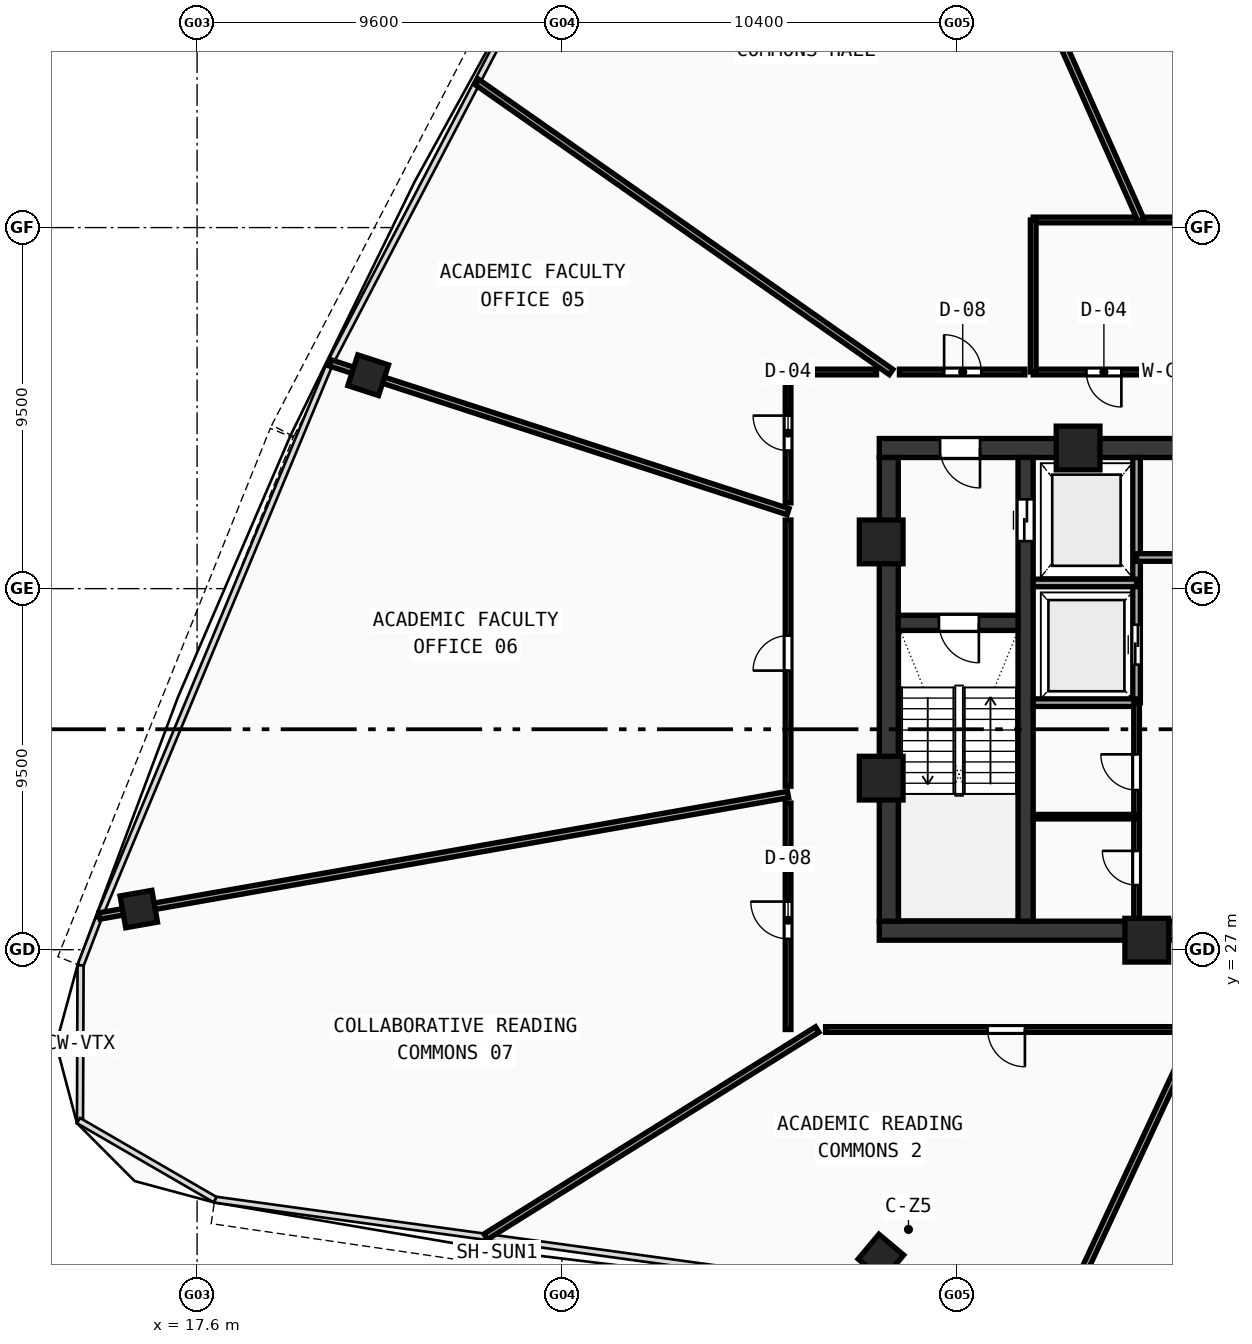
"""IFC4 building model, lengths in metres.
Left out: names, types, materials, properties, quantities, classifications, styles, units other than length and angle.
Written with IfcOpenShell. Run it as: python <this file> out.ifc"""

import sys

from ifc_helpers import new_model, si_unit, direction, frame, frame_2d, origin, origin_with_axes, origin_2d, place, context, subcontext, project, spatial, rectangle, hollow_rectangle, extrude, source, transform, mapped, element, fill, save


model = new_model("IFC4")
c1 = context("Model", 3, precision=1e-05, world=origin(), true_north=direction((0.0, 1.0)))
c2 = subcontext(c1, "Body", "Model", "MODEL_VIEW")
j1 = project(units=[si_unit("LENGTHUNIT", "METRE"), si_unit("PLANEANGLEUNIT", "RADIAN")], contexts=[c1])
p1 = place(None, origin())
s1 = spatial("IfcSite", under=j1, at=p1, CompositionType="ELEMENT")
p2 = place(p1, origin())
s2 = spatial("IfcBuilding", under=s1, at=p2, CompositionType="ELEMENT")
p3 = place(p2, frame((0.0, 0.0, 263.18)))
s3 = spatial("IfcBuildingStorey", under=s2, at=p3, CompositionType="ELEMENT", Elevation=263.18)
p4 = place(p3, frame((35.55, 27.5, 0.0), z_axis=(0.0, 0.0, 1.0), x_axis=(1.0, 0.0, 0.0)))
e1 = element("IfcWall", 1, at=p4, inside=s3, PredefinedType="SHEAR", context=c2, shape_type="SweptSolid", body=[
    extrude(rectangle(XDim=24.9, YDim=0.5, at=frame_2d((12.45, 0.0))), origin(), (0.0, 0.0, 1.0), 3.47),
])
p5 = place(p3, frame((35.55, 40.2, 0.0), z_axis=(0.0, 0.0, 1.0), x_axis=(1.0, 0.0, 0.0)))
e2 = element("IfcWall", 2, at=p5, inside=s3, PredefinedType="SHEAR", context=c2, shape_type="SweptSolid", body=[
    extrude(rectangle(XDim=11.25, YDim=0.5, at=frame_2d((5.625, 0.0))), origin(), (0.0, 0.0, 1.0), 3.47),
])
p6 = place(p5, frame((1.6, 0.0, 0.0)))
e3 = element("IfcOpeningElement", 3, at=p6, cuts=e2, PredefinedType="OPENING", context=c2, shape_type="SweptSolid", body=[
    extrude(rectangle(XDim=1.05, YDim=2.1, at=frame_2d((0.525, 1.05))), frame((0.0, 0.26, 0.0), z_axis=(0.0, -1.0, 0.0), x_axis=(1.0, 0.0, 0.0)), (0.0, 0.0, 1.0), 0.52),
])
p7 = place(p3, frame((35.8, 27.75, 0.0), z_axis=(0.0, 0.0, 1.0), x_axis=(0.0, 1.0, 0.0)))
e4 = element("IfcWall", 4, at=p7, inside=s3, PredefinedType="SHEAR", context=c2, shape_type="SweptSolid", body=[
    extrude(rectangle(XDim=12.2, YDim=0.5, at=frame_2d((6.1, 0.0))), origin(), (0.0, 0.0, 1.0), 3.47),
])
p8 = place(p3, frame((39.4, 27.75, 0.0), z_axis=(0.0, 0.0, 1.0), x_axis=(0.0, 1.0, 0.0)))
e5 = element("IfcWall", 5, at=p8, inside=s3, PredefinedType="SHEAR", context=c2, shape_type="SweptSolid", body=[
    extrude(rectangle(XDim=12.2, YDim=0.4, at=frame_2d((6.1, 0.0))), origin(), (0.0, 0.0, 1.0), 3.47),
])
p9 = place(p8, frame((10.0, 0.0, 0.0)))
e6 = element("IfcOpeningElement", 6, at=p9, cuts=e5, PredefinedType="OPENING", context=c2, shape_type="SweptSolid", body=[
    extrude(rectangle(XDim=1.1, YDim=2.1, at=frame_2d((0.55, 1.05))), frame((0.0, 0.21, 0.0), z_axis=(0.0, -1.0, 0.0), x_axis=(1.0, 0.0, 0.0)), (0.0, 0.0, 1.0), 0.42),
])
p10 = place(p3, frame((36.05, 35.6, 0.0), z_axis=(0.0, 0.0, 1.0), x_axis=(1.0, 0.0, 0.0)))
e7 = element("IfcWall", 7, at=p10, inside=s3, PredefinedType="SHEAR", context=c2, shape_type="SweptSolid", body=[
    extrude(rectangle(XDim=3.15, YDim=0.4, at=frame_2d((1.575, 0.0))), origin(), (0.0, 0.0, 1.0), 3.47),
])
p11 = place(p10, frame((1.07, 0.0, 0.0)))
e8 = element("IfcOpeningElement", 8, at=p11, cuts=e7, PredefinedType="OPENING", context=c2, shape_type="SweptSolid", body=[
    extrude(rectangle(XDim=1.05, YDim=2.1, at=frame_2d((0.525, 1.05))), frame((0.0, 0.21, 0.0), z_axis=(0.0, -1.0, 0.0), x_axis=(1.0, 0.0, 0.0)), (0.0, 0.0, 1.0), 0.42),
])
m1 = source(origin(), c2, "Body", "SweptSolid", [
    extrude(hollow_rectangle(XDim=1.15, YDim=1.15, WallThickness=0.048, at=origin_2d()), origin(), (0.0, 0.0, 1.0), 3.73),
])
for number, where, z_axis, x_axis in (
    (9, (42.588, 27.25, -0.26), (0.0, 0.0, 1.0), (1.0, 0.0, 0.0)),
    (10, (40.781, 40.2, -0.26), (0.0, 0.0, 1.0), (1.0, 0.0, 0.0)),
    (11, (35.6, 37.729, -0.26), (0.0, 0.0, 1.0), (1.0, 0.0, 0.0)),
    (12, (35.6, 31.513, -0.26), (0.0, 0.0, 1.0), (1.0, 0.0, 0.0)),
):
    element("IfcColumn", number, at=place(p3, frame(where, z_axis=z_axis, x_axis=x_axis)), inside=s3, PredefinedType="COLUMN", context=c2, shape_type="MappedRepresentation", body=[
        mapped(m1, transform((0.0, 0.0, 0.0), scale=1.0)),
    ])
m2 = source(origin(), c2, "Body", "SweptSolid", [
    extrude(hollow_rectangle(XDim=0.85, YDim=0.85, WallThickness=0.034, at=origin_2d()), origin(), (0.0, 0.0, 1.0), 3.73),
])
for number, where, z_axis, x_axis in (
    (13, (35.593, 18.914, -0.26), (0.0, 0.0, 1.0), (0.766, -0.643, 0.0)),
    (14, (22.102, 42.115, -0.26), (0.0, 0.0, 1.0), (-0.309, -0.951, 0.0)),
    (15, (16.066, 28.069, -0.26), (0.0, 0.0, 1.0), (0.174, -0.985, 0.0)),
):
    element("IfcColumn", number, at=place(p3, frame(where, z_axis=z_axis, x_axis=x_axis)), inside=s3, PredefinedType="COLUMN", context=c2, shape_type="MappedRepresentation", body=[
        mapped(m2, transform((0.0, 0.0, 0.0), scale=1.0)),
    ])
p12 = place(p3, frame((42.32, 33.5, 0.0), z_axis=(0.0, 0.0, 1.0), x_axis=(0.0, 1.0, 0.0)))
e16 = element("IfcWall", 16, at=p12, inside=s3, PredefinedType="SOLIDWALL", context=c2, shape_type="SweptSolid", body=[
    extrude(rectangle(XDim=6.45, YDim=0.2, at=frame_2d((3.225, 0.0))), origin(), (0.0, 0.0, 1.0), 3.47),
])
p13 = place(p12, frame((1.0, 0.0, 0.0)))
e17 = element("IfcOpeningElement", 17, at=p13, cuts=e16, PredefinedType="OPENING", context=c2, shape_type="SweptSolid", body=[
    extrude(rectangle(XDim=1.05, YDim=2.1, at=frame_2d((0.525, 1.05))), frame((0.0, 0.11, 0.0), z_axis=(0.0, -1.0, 0.0), x_axis=(1.0, 0.0, 0.0)), (0.0, 0.0, 1.0), 0.22),
])
for number, where, z_axis, x_axis in (
    (18, (39.6, 36.65, 0.0), (0.0, 0.0, 1.0), (1.0, 0.0, 0.0)),
    (19, (39.6, 33.5, 0.0), (0.0, 0.0, 1.0), (1.0, 0.0, 0.0)),
):
    element("IfcWall", number, at=place(p3, frame(where, z_axis=z_axis, x_axis=x_axis)), inside=s3, PredefinedType="SOLIDWALL", context=c2, shape_type="SweptSolid", body=[
        extrude(rectangle(XDim=2.72, YDim=0.2, at=frame_2d((1.36, 0.0))), origin(), (0.0, 0.0, 1.0), 3.47),
    ])
p14 = place(p3, frame((42.32, 37.32, 0.0), z_axis=(0.0, 0.0, 1.0), x_axis=(1.0, 0.0, 0.0)))
e20 = element("IfcWall", 20, at=p14, inside=s3, PredefinedType="SOLIDWALL", context=c2, shape_type="SweptSolid", body=[
    extrude(rectangle(XDim=4.73, YDim=0.2, at=frame_2d((2.365, 0.0))), origin(), (0.0, 0.0, 1.0), 3.47),
])
p15 = place(p14, frame((1.8, 0.0, 0.0)))
e21 = element("IfcOpeningElement", 21, at=p15, cuts=e20, PredefinedType="OPENING", context=c2, shape_type="SweptSolid", body=[
    extrude(rectangle(XDim=0.9, YDim=2.1, at=frame_2d((0.45, 1.05))), frame((0.0, 0.11, 0.0), z_axis=(0.0, -1.0, 0.0), x_axis=(1.0, 0.0, 0.0)), (0.0, 0.0, 1.0), 0.22),
])
p16 = place(p3, frame((42.32, 27.6, 0.0), z_axis=(0.0, 0.0, 1.0), x_axis=(0.0, 1.0, 0.0)))
e22 = element("IfcWall", 22, at=p16, inside=s3, PredefinedType="PARTITIONING", context=c2, shape_type="SweptSolid", body=[
    extrude(rectangle(XDim=5.9, YDim=0.15, at=frame_2d((2.95, 0.0))), origin(), (0.0, 0.0, 1.0), 3.47),
])
p17 = place(p16, frame((1.1, 0.0, 0.0)))
e23 = element("IfcOpeningElement", 23, at=p17, cuts=e22, PredefinedType="OPENING", context=c2, shape_type="SweptSolid", body=[
    extrude(rectangle(XDim=0.9, YDim=2.1, at=frame_2d((0.45, 1.05))), frame((0.0, 0.085, 0.0), z_axis=(0.0, -1.0, 0.0), x_axis=(1.0, 0.0, 0.0)), (0.0, 0.0, 1.0), 0.17),
])
p18 = place(p16, frame((3.6, 0.0, 0.0)))
e24 = element("IfcOpeningElement", 24, at=p18, cuts=e22, PredefinedType="OPENING", context=c2, shape_type="SweptSolid", body=[
    extrude(rectangle(XDim=0.94, YDim=2.1, at=frame_2d((0.47, 1.05))), frame((0.0, 0.085, 0.0), z_axis=(0.0, -1.0, 0.0), x_axis=(1.0, 0.0, 0.0)), (0.0, 0.0, 1.0), 0.17),
])
p19 = place(p3, frame((39.6, 30.5, 0.0), z_axis=(0.0, 0.0, 1.0), x_axis=(1.0, 0.0, 0.0)))
e25 = element("IfcWall", 25, at=p19, inside=s3, PredefinedType="PARTITIONING", context=c2, shape_type="SweptSolid", body=[
    extrude(rectangle(XDim=2.72, YDim=0.12, at=frame_2d((1.36, 0.0))), origin(), (0.0, 0.0, 1.0), 3.47),
])
p20 = place(p3, frame((39.6, 42.2, 0.0), z_axis=(0.0, 0.0, 1.0), x_axis=(1.0, 0.0, 0.0)))
e26 = element("IfcWall", 26, at=p20, inside=s3, PredefinedType="PARTITIONING", context=c2, shape_type="SweptSolid", body=[
    extrude(rectangle(XDim=4.35, YDim=0.15, at=frame_2d((2.175, 0.0))), origin(), (0.0, 0.0, 1.0), 3.47),
])
p21 = place(p20, frame((1.4, 0.0, 0.0)))
e27 = element("IfcOpeningElement", 27, at=p21, cuts=e26, PredefinedType="OPENING", context=c2, shape_type="SweptSolid", body=[
    extrude(rectangle(XDim=0.92, YDim=2.1, at=frame_2d((0.46, 1.05))), frame((0.0, 0.085, 0.0), z_axis=(0.0, -1.0, 0.0), x_axis=(1.0, 0.0, 0.0)), (0.0, 0.0, 1.0), 0.17),
])
p22 = place(p3, frame((39.6, 46.2, 0.0), z_axis=(0.0, 0.0, 1.0), x_axis=(1.0, 0.0, 0.0)))
e28 = element("IfcWall", 28, at=p22, inside=s3, PredefinedType="PARTITIONING", context=c2, shape_type="SweptSolid", body=[
    extrude(rectangle(XDim=4.35, YDim=0.15, at=frame_2d((2.175, 0.0))), origin(), (0.0, 0.0, 1.0), 2.82),
])
p23 = place(p3, frame((39.6, 42.2, 0.0), z_axis=(0.0, 0.0, 1.0), x_axis=(0.0, 1.0, 0.0)))
e29 = element("IfcWall", 29, at=p23, inside=s3, PredefinedType="PARTITIONING", context=c2, shape_type="SweptSolid", body=[
    extrude(rectangle(XDim=4.0, YDim=0.15, at=frame_2d((2.0, 0.0))), origin(), (0.0, 0.0, 1.0), 3.47),
])
p24 = place(p3, frame((42.435, 46.2, 0.0), z_axis=(0.0, 0.0, 1.0), x_axis=(-0.406734534197, 0.913546396573, 0.0)))
e30 = element("IfcWall", 30, at=p24, inside=s3, PredefinedType="PARTITIONING", context=c2, shape_type="SweptSolid", body=[
    extrude(rectangle(XDim=20.329, YDim=0.17, at=frame_2d((10.164, 0.0))), origin(), (0.0, 0.0, 1.0), 2.82),
])
p25 = place(p3, frame((35.861, 42.2, 0.0), z_axis=(0.0, 0.0, 1.0), x_axis=(-0.819147381932, 0.57358309483, 0.0)))
e31 = element("IfcWall", 31, at=p25, inside=s3, PredefinedType="PARTITIONING", context=c2, shape_type="SweptSolid", body=[
    extrude(rectangle(XDim=13.297, YDim=0.17, at=frame_2d((6.649, 0.0))), origin(), (0.0, 0.0, 1.0), 2.82),
])
p26 = place(p3, frame((33.15, 38.525, 0.0), z_axis=(0.0, 0.0, 1.0), x_axis=(-0.951057436246, 0.309014163043, 0.0)))
e32 = element("IfcWall", 32, at=p26, inside=s3, PredefinedType="PARTITIONING", context=c2, shape_type="SweptSolid", body=[
    extrude(rectangle(XDim=12.667, YDim=0.17, at=frame_2d((6.333, 0.0))), origin(), (0.0, 0.0, 1.0), 2.82),
])
p27 = place(p3, frame((33.15, 31.082, 0.0), z_axis=(0.0, 0.0, 1.0), x_axis=(-0.984806394916, -0.173655879639, 0.0)))
e33 = element("IfcWall", 33, at=p27, inside=s3, PredefinedType="PARTITIONING", context=c2, shape_type="SweptSolid", body=[
    extrude(rectangle(XDim=18.397, YDim=0.17, at=frame_2d((9.199, 0.0))), origin(), (0.0, 0.0, 1.0), 2.82),
])
p28 = place(p3, frame((33.917, 24.9, 0.0), z_axis=(0.0, 0.0, 1.0), x_axis=(-0.848046300914, -0.529922137211, 0.0)))
e34 = element("IfcWall", 34, at=p28, inside=s3, PredefinedType="PARTITIONING", context=c2, shape_type="SweptSolid", body=[
    extrude(rectangle(XDim=10.287, YDim=0.17, at=frame_2d((5.143, 0.0))), origin(), (0.0, 0.0, 1.0), 2.82),
])
p29 = place(p3, frame((43.896, 24.9, 0.0), z_axis=(0.0, 0.0, 1.0), x_axis=(-0.422631029952, -0.906301833012, 0.0)))
e35 = element("IfcWall", 35, at=p29, inside=s3, PredefinedType="PARTITIONING", context=c2, shape_type="SweptSolid", body=[
    extrude(rectangle(XDim=7.827, YDim=0.17, at=frame_2d((3.914, 0.0))), origin(), (0.0, 0.0, 1.0), 2.82),
])
p30 = place(p3, frame((33.15, 24.9, 0.0), z_axis=(0.0, 0.0, 1.0), x_axis=(0.0, 1.0, 0.0)))
e36 = element("IfcWall", 36, at=p30, inside=s3, PredefinedType="PARTITIONING", context=c2, shape_type="SweptSolid", body=[
    extrude(rectangle(XDim=5.958, YDim=0.15, at=frame_2d((2.979, 0.0))), origin(), (0.0, 0.0, 1.0), 3.12),
])
p31 = place(p30, frame((2.386, 0.0, 0.0)))
e37 = element("IfcOpeningElement", 37, at=p31, cuts=e36, PredefinedType="OPENING", context=c2, shape_type="SweptSolid", body=[
    extrude(rectangle(XDim=0.98, YDim=2.12, at=frame_2d((0.49, 1.06))), frame((0.0, 0.085, 0.0), z_axis=(0.0, -1.0, 0.0), x_axis=(1.0, 0.0, 0.0)), (0.0, 0.0, 1.0), 0.17),
])
p32 = place(p3, frame((33.15, 31.301, 0.0), z_axis=(0.0, 0.0, 1.0), x_axis=(0.0, 1.0, 0.0)))
e38 = element("IfcWall", 38, at=p32, inside=s3, PredefinedType="PARTITIONING", context=c2, shape_type="SweptSolid", body=[
    extrude(rectangle(XDim=7.004, YDim=0.15, at=frame_2d((3.502, 0.0))), origin(), (0.0, 0.0, 1.0), 3.47),
])
p33 = place(p32, frame((3.042, 0.0, 0.0)))
e39 = element("IfcOpeningElement", 39, at=p33, cuts=e38, PredefinedType="OPENING", context=c2, shape_type="SweptSolid", body=[
    extrude(rectangle(XDim=0.92, YDim=2.1, at=frame_2d((0.46, 1.05))), frame((0.0, 0.085, 0.0), z_axis=(0.0, -1.0, 0.0), x_axis=(1.0, 0.0, 0.0)), (0.0, 0.0, 1.0), 0.17),
])
p34 = place(p3, frame((33.15, 38.756, 0.0), z_axis=(0.0, 0.0, 1.0), x_axis=(0.0, 1.0, 0.0)))
e40 = element("IfcWall", 40, at=p34, inside=s3, PredefinedType="PARTITIONING", context=c2, shape_type="SweptSolid", body=[
    extrude(rectangle(XDim=3.444, YDim=0.15, at=frame_2d((1.722, 0.0))), origin(), (0.0, 0.0, 1.0), 3.12),
])
p35 = place(p34, frame((1.376, 0.0, 0.0)))
e41 = element("IfcOpeningElement", 41, at=p35, cuts=e40, PredefinedType="OPENING", context=c2, shape_type="SweptSolid", body=[
    extrude(rectangle(XDim=0.92, YDim=2.1, at=frame_2d((0.46, 1.05))), frame((0.0, 0.085, 0.0), z_axis=(0.0, -1.0, 0.0), x_axis=(1.0, 0.0, 0.0)), (0.0, 0.0, 1.0), 0.17),
])
p36 = place(p3, frame((33.15, 42.2, 0.0), z_axis=(0.0, 0.0, 1.0), x_axis=(1.0, 0.0, 0.0)))
e42 = element("IfcWall", 42, at=p36, inside=s3, PredefinedType="PARTITIONING", context=c2, shape_type="SweptSolid", body=[
    extrude(rectangle(XDim=2.327, YDim=0.15, at=frame_2d((1.164, 0.0))), origin(), (0.0, 0.0, 1.0), 3.12),
])
p37 = place(p3, frame((36.081, 42.2, 0.0), z_axis=(0.0, 0.0, 1.0), x_axis=(1.0, 0.0, 0.0)))
e43 = element("IfcWall", 43, at=p37, inside=s3, PredefinedType="PARTITIONING", context=c2, shape_type="SweptSolid", body=[
    extrude(rectangle(XDim=3.299, YDim=0.15, at=frame_2d((1.65, 0.0))), origin(), (0.0, 0.0, 1.0), 2.82),
])
p38 = place(p37, frame((1.175, 0.0, 0.0)))
e44 = element("IfcOpeningElement", 44, at=p38, cuts=e43, PredefinedType="OPENING", context=c2, shape_type="SweptSolid", body=[
    extrude(rectangle(XDim=0.98, YDim=2.12, at=frame_2d((0.49, 1.06))), frame((0.0, 0.085, 0.0), z_axis=(0.0, -1.0, 0.0), x_axis=(1.0, 0.0, 0.0)), (0.0, 0.0, 1.0), 0.17),
])
p39 = place(p3, frame((43.654, 24.9, 0.0), z_axis=(0.0, 0.0, 1.0), x_axis=(-1.0, 0.0, 0.0)))
e45 = element("IfcWall", 45, at=p39, inside=s3, PredefinedType="PARTITIONING", context=c2, shape_type="SweptSolid", body=[
    extrude(rectangle(XDim=9.517, YDim=0.15, at=frame_2d((4.758, 0.0))), origin(), (0.0, 0.0, 1.0), 2.82),
])
p40 = place(p39, frame((4.272, 0.0, 0.0)))
e46 = element("IfcOpeningElement", 46, at=p40, cuts=e45, PredefinedType="OPENING", context=c2, shape_type="SweptSolid", body=[
    extrude(rectangle(XDim=0.98, YDim=2.12, at=frame_2d((0.49, 1.06))), frame((0.0, 0.085, 0.0), z_axis=(0.0, -1.0, 0.0), x_axis=(1.0, 0.0, 0.0)), (0.0, 0.0, 1.0), 0.17),
])
m3 = source(origin(), c2, "Body", "SweptSolid", [
    extrude(rectangle(XDim=1.05, YDim=2.1, at=frame_2d((0.525, 1.05))), frame((0.0, 0.025, 0.0), z_axis=(0.0, -1.0, 0.0), x_axis=(1.0, 0.0, 0.0)), (0.0, 0.0, 1.0), 0.05),
])
p41 = place(p11, frame((1.05, 0.0, 0.0), z_axis=(0.0, 0.0, 1.0), x_axis=(-1.0, 0.0, 0.0)))
e47 = element("IfcDoor", 47, at=p41, inside=s3, OperationType="SINGLE_SWING_LEFT", PredefinedType="DOOR", context=c2, shape_type="MappedRepresentation", body=[
    mapped(m3, transform((0.0, 0.0, 0.0), scale=1.0)),
])
fill(e8, e47)
p42 = place(p6, frame((1.05, 0.0, 0.0), z_axis=(0.0, 0.0, 1.0), x_axis=(-1.0, 0.0, 0.0)))
e48 = element("IfcDoor", 48, at=p42, inside=s3, OperationType="SINGLE_SWING_LEFT", PredefinedType="DOOR", context=c2, shape_type="MappedRepresentation", body=[
    mapped(m3, transform((0.0, 0.0, 0.0), scale=1.0)),
])
fill(e3, e48)
m4 = source(origin(), c2, "Body", "SweptSolid", [
    extrude(rectangle(XDim=1.1, YDim=2.1, at=frame_2d((0.55, 1.05))), frame((0.0, 0.025, 0.0), z_axis=(0.0, -1.0, 0.0), x_axis=(1.0, 0.0, 0.0)), (0.0, 0.0, 1.0), 0.05),
])
p43 = place(p9, frame((1.1, 0.0, 0.0), z_axis=(0.0, 0.0, 1.0), x_axis=(-1.0, 0.0, 0.0)))
e49 = element("IfcDoor", 49, at=p43, inside=s3, OperationType="DOUBLE_DOOR_SLIDING", PredefinedType="DOOR", context=c2, shape_type="MappedRepresentation", body=[
    mapped(m4, transform((0.0, 0.0, 0.0), scale=1.0)),
])
fill(e6, e49)
p44 = place(p13, origin_with_axes())
e50 = element("IfcDoor", 50, at=p44, inside=s3, OperationType="DOUBLE_DOOR_SLIDING", PredefinedType="DOOR", context=c2, shape_type="MappedRepresentation", body=[
    mapped(m3, transform((0.0, 0.0, 0.0), scale=1.0)),
])
fill(e17, e50)
m5 = source(origin(), c2, "Body", "SweptSolid", [
    extrude(rectangle(XDim=0.9, YDim=2.1, at=frame_2d((0.45, 1.05))), frame((0.0, 0.025, 0.0), z_axis=(0.0, -1.0, 0.0), x_axis=(1.0, 0.0, 0.0)), (0.0, 0.0, 1.0), 0.05),
])
p45 = place(p17, origin_with_axes())
e51 = element("IfcDoor", 51, at=p45, inside=s3, OperationType="SINGLE_SWING_RIGHT", PredefinedType="DOOR", context=c2, shape_type="MappedRepresentation", body=[
    mapped(m5, transform((0.0, 0.0, 0.0), scale=1.0)),
])
fill(e23, e51)
m6 = source(origin(), c2, "Body", "SweptSolid", [
    extrude(rectangle(XDim=0.94, YDim=2.1, at=frame_2d((0.47, 1.05))), frame((0.0, 0.025, 0.0), z_axis=(0.0, -1.0, 0.0), x_axis=(1.0, 0.0, 0.0)), (0.0, 0.0, 1.0), 0.05),
])
p46 = place(p18, origin_with_axes())
e52 = element("IfcDoor", 52, at=p46, inside=s3, OperationType="SINGLE_SWING_RIGHT", PredefinedType="DOOR", context=c2, shape_type="MappedRepresentation", body=[
    mapped(m6, transform((0.0, 0.0, 0.0), scale=1.0)),
])
fill(e24, e52)
m7 = source(origin(), c2, "Body", "SweptSolid", [
    extrude(rectangle(XDim=0.92, YDim=2.1, at=frame_2d((0.46, 1.05))), frame((0.0, 0.025, 0.0), z_axis=(0.0, -1.0, 0.0), x_axis=(1.0, 0.0, 0.0)), (0.0, 0.0, 1.0), 0.05),
])
p47 = place(p21, frame((0.92, 0.0, 0.0), z_axis=(0.0, 0.0, 1.0), x_axis=(-1.0, 0.0, 0.0)))
e53 = element("IfcDoor", 53, at=p47, inside=s3, OperationType="SINGLE_SWING_LEFT", PredefinedType="DOOR", context=c2, shape_type="MappedRepresentation", body=[
    mapped(m7, transform((0.0, 0.0, 0.0), scale=1.0)),
])
fill(e27, e53)
m8 = source(origin(), c2, "Body", "SweptSolid", [
    extrude(rectangle(XDim=0.98, YDim=2.12, at=frame_2d((0.49, 1.06))), frame((0.0, 0.025, 0.0), z_axis=(0.0, -1.0, 0.0), x_axis=(1.0, 0.0, 0.0)), (0.0, 0.0, 1.0), 0.05),
])
p48 = place(p38, origin_with_axes())
e54 = element("IfcDoor", 54, at=p48, inside=s3, OperationType="SINGLE_SWING_LEFT", PredefinedType="DOOR", context=c2, shape_type="MappedRepresentation", body=[
    mapped(m8, transform((0.0, 0.0, 0.0), scale=1.0)),
])
fill(e44, e54)
p49 = place(p35, origin_with_axes())
e55 = element("IfcDoor", 55, at=p49, inside=s3, OperationType="SINGLE_SWING_RIGHT", PredefinedType="DOOR", context=c2, shape_type="MappedRepresentation", body=[
    mapped(m7, transform((0.0, 0.0, 0.0), scale=1.0)),
])
fill(e41, e55)
p50 = place(p33, origin_with_axes())
e56 = element("IfcDoor", 56, at=p50, inside=s3, OperationType="SINGLE_SWING_LEFT", PredefinedType="DOOR", context=c2, shape_type="MappedRepresentation", body=[
    mapped(m7, transform((0.0, 0.0, 0.0), scale=1.0)),
])
fill(e39, e56)
p51 = place(p31, origin_with_axes())
e57 = element("IfcDoor", 57, at=p51, inside=s3, OperationType="SINGLE_SWING_RIGHT", PredefinedType="DOOR", context=c2, shape_type="MappedRepresentation", body=[
    mapped(m8, transform((0.0, 0.0, 0.0), scale=1.0)),
])
fill(e37, e57)
p52 = place(p40, origin_with_axes())
e58 = element("IfcDoor", 58, at=p52, inside=s3, OperationType="SINGLE_SWING_LEFT", PredefinedType="DOOR", context=c2, shape_type="MappedRepresentation", body=[
    mapped(m8, transform((0.0, 0.0, 0.0), scale=1.0)),
])
fill(e46, e58)
save(model, sys.argv[1])
